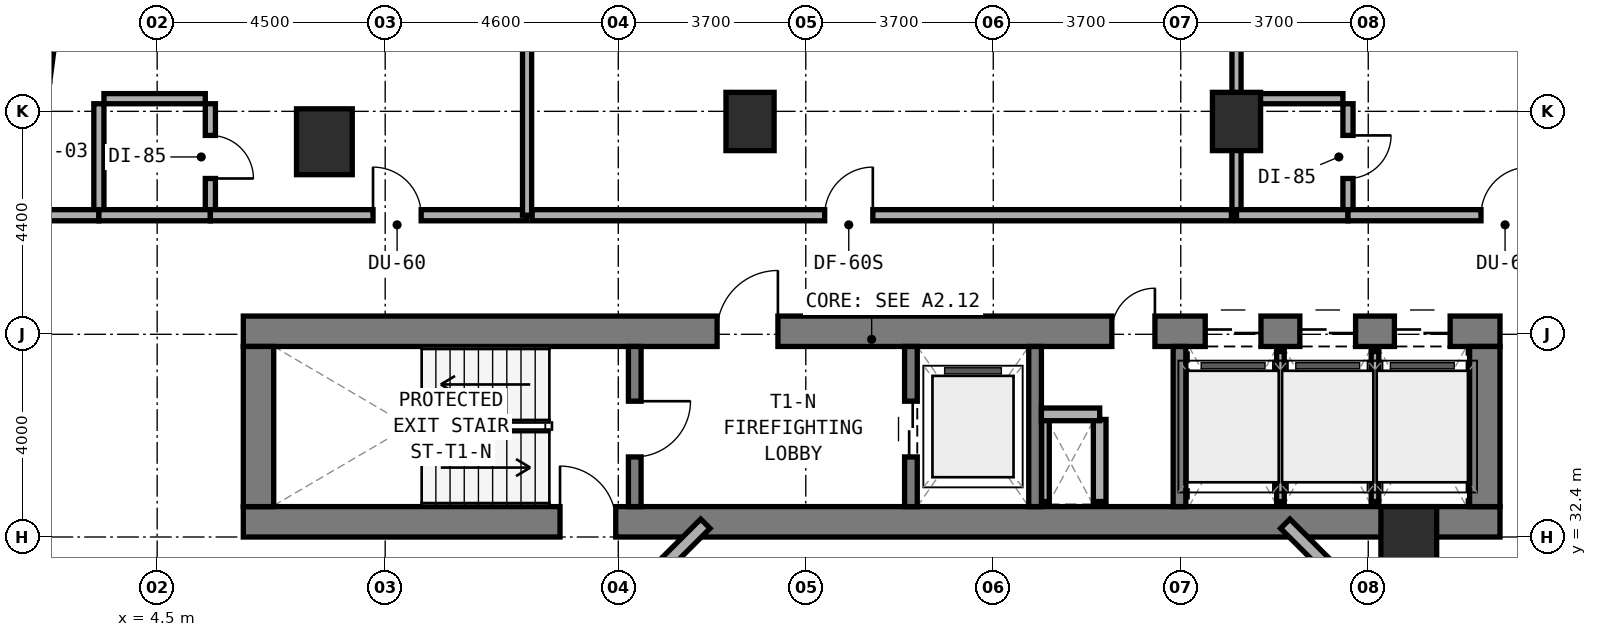
"""IFC4 building model, lengths in metres.
Left out: names, types, materials, properties, quantities, classifications, styles, units other than length and angle.
Written with IfcOpenShell. Run it as: python <this file> out.ifc"""

import sys

from ifc_helpers import new_model, si_unit, direction, frame, frame_2d, origin, origin_2d, place, context, subcontext, project, spatial, rectangle, extrude, element, fill, save


model = new_model("IFC4")
c1 = context("Model", 3, precision=1e-05, world=origin(), true_north=direction((0.0, 1.0)))
c2 = subcontext(c1, "Body", "Model", "MODEL_VIEW")
j1 = project(units=[si_unit("LENGTHUNIT", "METRE"), si_unit("PLANEANGLEUNIT", "RADIAN")], contexts=[c1])
p1 = place(None, origin())
s1 = spatial("IfcSite", under=j1, at=p1, CompositionType="ELEMENT")
p2 = place(p1, origin())
s2 = spatial("IfcBuilding", under=s1, at=p2, CompositionType="ELEMENT")
p3 = place(p2, frame((0.0, 0.0, 45.0)))
s3 = spatial("IfcBuildingStorey", under=s2, at=p3, CompositionType="ELEMENT", Elevation=45.0)
p4 = place(p3, frame((6.2, 32.7, 0.0), z_axis=(0.0, 0.0, 1.0), x_axis=(1.0, 0.0, 0.0)))
e1 = element("IfcWall", 1, at=p4, inside=s3, PredefinedType="SHEAR", context=c2, shape_type="SweptSolid", body=[
    extrude(rectangle(XDim=24.8, YDim=0.6, at=frame_2d((12.4, 0.0))), origin(), (0.0, 0.0, 1.0), 3.5),
])
p5 = place(p4, frame((6.25, 0.0, 0.0)))
e2 = element("IfcOpeningElement", 2, at=p5, cuts=e1, PredefinedType="OPENING", context=c2, shape_type="SweptSolid", body=[
    extrude(rectangle(XDim=1.1, YDim=2.15, at=frame_2d((0.55, 1.075))), frame((0.0, 0.31, 0.0), z_axis=(0.0, -1.0, 0.0), x_axis=(1.0, 0.0, 0.0)), (0.0, 0.0, 1.0), 0.62),
])
p6 = place(p3, frame((6.2, 36.46, 0.0), z_axis=(0.0, 0.0, 1.0), x_axis=(1.0, 0.0, 0.0)))
e3 = element("IfcWall", 3, at=p6, inside=s3, PredefinedType="SHEAR", context=c2, shape_type="SweptSolid", body=[
    extrude(rectangle(XDim=24.8, YDim=0.6, at=frame_2d((12.4, 0.0))), origin(), (0.0, 0.0, 1.0), 3.5),
])
p7 = place(p6, frame((9.35, 0.0, 0.0)))
e4 = element("IfcOpeningElement", 4, at=p7, cuts=e3, PredefinedType="OPENING", context=c2, shape_type="SweptSolid", body=[
    extrude(rectangle(XDim=1.2, YDim=2.15, at=frame_2d((0.6, 1.075))), frame((0.0, 0.31, 0.0), z_axis=(0.0, -1.0, 0.0), x_axis=(1.0, 0.0, 0.0)), (0.0, 0.0, 1.0), 0.62),
])
p8 = place(p6, frame((17.14, 0.0, 0.0)))
e5 = element("IfcOpeningElement", 5, at=p8, cuts=e3, PredefinedType="OPENING", context=c2, shape_type="SweptSolid", body=[
    extrude(rectangle(XDim=0.85, YDim=2.1, at=frame_2d((0.425, 1.05))), frame((0.0, 0.31, 0.0), z_axis=(0.0, -1.0, 0.0), x_axis=(1.0, 0.0, 0.0)), (0.0, 0.0, 1.0), 0.62),
])
p9 = place(p6, frame((18.983, 0.0, 0.0)))
e6 = element("IfcOpeningElement", 6, at=p9, cuts=e3, PredefinedType="OPENING", context=c2, shape_type="SweptSolid", body=[
    extrude(rectangle(XDim=1.1, YDim=2.15, at=frame_2d((0.55, 1.075))), frame((0.0, 0.31, 0.0), z_axis=(0.0, -1.0, 0.0), x_axis=(1.0, 0.0, 0.0)), (0.0, 0.0, 1.0), 0.62),
])
p10 = place(p6, frame((20.85, 0.0, 0.0)))
e7 = element("IfcOpeningElement", 7, at=p10, cuts=e3, PredefinedType="OPENING", context=c2, shape_type="SweptSolid", body=[
    extrude(rectangle(XDim=1.1, YDim=2.15, at=frame_2d((0.55, 1.075))), frame((0.0, 0.31, 0.0), z_axis=(0.0, -1.0, 0.0), x_axis=(1.0, 0.0, 0.0)), (0.0, 0.0, 1.0), 0.62),
])
p11 = place(p6, frame((22.716, 0.0, 0.0)))
e8 = element("IfcOpeningElement", 8, at=p11, cuts=e3, PredefinedType="OPENING", context=c2, shape_type="SweptSolid", body=[
    extrude(rectangle(XDim=1.1, YDim=2.15, at=frame_2d((0.55, 1.075))), frame((0.0, 0.31, 0.0), z_axis=(0.0, -1.0, 0.0), x_axis=(1.0, 0.0, 0.0)), (0.0, 0.0, 1.0), 0.62),
])
for number, where, z_axis, x_axis in (
    (9, (6.5, 33.0, 0.0), (0.0, 0.0, 1.0), (0.0, 1.0, 0.0)),
    (10, (30.7, 33.0, 0.0), (0.0, 0.0, 1.0), (0.0, 1.0, 0.0)),
):
    element("IfcWall", number, at=place(p3, frame(where, z_axis=z_axis, x_axis=x_axis)), inside=s3, PredefinedType="SHEAR", context=c2, shape_type="SweptSolid", body=[
        extrude(rectangle(XDim=3.16, YDim=0.6, at=frame_2d((1.58, 0.0))), origin(), (0.0, 0.0, 1.0), 3.5),
    ])
p12 = place(p3, frame((13.925, 33.0, 0.0), z_axis=(0.0, 0.0, 1.0), x_axis=(0.0, 1.0, 0.0)))
e11 = element("IfcWall", 11, at=p12, inside=s3, PredefinedType="STANDARD", context=c2, shape_type="SweptSolid", body=[
    extrude(rectangle(XDim=3.16, YDim=0.25, at=frame_2d((1.58, 0.0))), origin(), (0.0, 0.0, 1.0), 3.22),
])
p13 = place(p12, frame((0.98, 0.0, 0.0)))
e12 = element("IfcOpeningElement", 12, at=p13, cuts=e11, PredefinedType="OPENING", context=c2, shape_type="SweptSolid", body=[
    extrude(rectangle(XDim=1.1, YDim=2.15, at=frame_2d((0.55, 1.075))), frame((0.0, 0.135, 0.0), z_axis=(0.0, -1.0, 0.0), x_axis=(1.0, 0.0, 0.0)), (0.0, 0.0, 1.0), 0.27),
])
p14 = place(p3, frame((19.375, 33.0, 0.0), z_axis=(0.0, 0.0, 1.0), x_axis=(0.0, 1.0, 0.0)))
e13 = element("IfcWall", 13, at=p14, inside=s3, PredefinedType="STANDARD", context=c2, shape_type="SweptSolid", body=[
    extrude(rectangle(XDim=3.16, YDim=0.25, at=frame_2d((1.58, 0.0))), origin(), (0.0, 0.0, 1.0), 3.22),
])
p15 = place(p14, frame((0.98, 0.0, 0.0)))
e14 = element("IfcOpeningElement", 14, at=p15, cuts=e13, PredefinedType="OPENING", context=c2, shape_type="SweptSolid", body=[
    extrude(rectangle(XDim=1.1, YDim=2.15, at=frame_2d((0.55, 1.075))), frame((0.0, 0.135, 0.0), z_axis=(0.0, -1.0, 0.0), x_axis=(1.0, 0.0, 0.0)), (0.0, 0.0, 1.0), 0.27),
])
for number, where, z_axis, x_axis in (
    (15, (21.825, 33.0, 0.0), (0.0, 0.0, 1.0), (0.0, 1.0, 0.0)),
    (16, (24.675, 33.0, 0.0), (0.0, 0.0, 1.0), (0.0, 1.0, 0.0)),
):
    element("IfcWall", number, at=place(p3, frame(where, z_axis=z_axis, x_axis=x_axis)), inside=s3, PredefinedType="STANDARD", context=c2, shape_type="SweptSolid", body=[
        extrude(rectangle(XDim=3.16, YDim=0.25, at=frame_2d((1.58, 0.0))), origin(), (0.0, 0.0, 1.0), 3.22),
    ])
for number, where, z_axis, x_axis in (
    (17, (16.2, 40.6, 0.0), (0.0, 0.0, 1.0), (1.0, 0.0, 0.0)),
    (18, (25.8, 40.6, 0.0), (0.0, 0.0, 1.0), (1.0, 0.0, 0.0)),
):
    element("IfcColumn", number, at=place(p3, frame(where, z_axis=z_axis, x_axis=x_axis)), inside=s3, PredefinedType="COLUMN", context=c2, shape_type="SweptSolid", body=[
        extrude(rectangle(XDim=0.95, YDim=1.15, at=origin_2d()), origin(), (0.0, 0.0, 1.0), 3.5),
    ])
for number, where, z_axis, x_axis in (
    (19, (7.8, 40.2, 0.0), (0.0, 0.0, 1.0), (1.0, 0.0, 0.0)),
    (20, (29.2, 32.35, 0.0), (0.0, 0.0, 1.0), (1.0, 0.0, 0.0)),
):
    element("IfcColumn", number, at=place(p3, frame(where, z_axis=z_axis, x_axis=x_axis)), inside=s3, PredefinedType="COLUMN", context=c2, shape_type="SweptSolid", body=[
        extrude(rectangle(XDim=1.1, YDim=1.3, at=origin_2d()), origin(), (0.0, 0.0, 1.0), 3.5),
    ])
p16 = place(p3, frame((2.355, 42.337, 0.0), z_axis=(0.0, 0.0, 1.0), x_axis=(-0.130454512571, -0.991454295543, 0.0)))
e21 = element("IfcWall", 21, at=p16, inside=s3, PredefinedType="STANDARD", context=c2, shape_type="SweptSolid", body=[
    extrude(rectangle(XDim=0.973, YDim=0.3, at=frame_2d((0.487, 0.0))), origin(), (0.0, 0.0, 1.0), 3.22),
])
p17 = place(p3, frame((28.596, 30.828, 0.0), z_axis=(0.0, 0.0, 1.0), x_axis=(-0.707059717605, 0.707153841636, 0.0)))
e22 = element("IfcWall", 22, at=p17, inside=s3, PredefinedType="STANDARD", context=c2, shape_type="SweptSolid", body=[
    extrude(rectangle(XDim=2.594, YDim=0.26, at=frame_2d((1.297, 0.0))), origin(), (0.0, 0.0, 1.0), 3.22),
])
p18 = place(p3, frame((15.318, 32.662, 0.0), z_axis=(0.0, 0.0, 1.0), x_axis=(-0.707106781187, -0.707106781187, 0.0)))
e23 = element("IfcWall", 23, at=p18, inside=s3, PredefinedType="STANDARD", context=c2, shape_type="SweptSolid", body=[
    extrude(rectangle(XDim=2.594, YDim=0.26, at=frame_2d((1.297, 0.0))), origin(), (0.0, 0.0, 1.0), 3.22),
])
p19 = place(p3, frame((22.03, 33.1, 0.0), z_axis=(0.0, 0.0, 1.0), x_axis=(0.0, 1.0, 0.0)))
e24 = element("IfcWall", 24, at=p19, inside=s3, PredefinedType="PARTITIONING", context=c2, shape_type="SweptSolid", body=[
    extrude(rectangle(XDim=1.62, YDim=0.15, at=frame_2d((0.81, 0.0))), origin(), (0.0, 0.0, 1.0), 3.22),
])
p20 = place(p3, frame((23.1, 33.1, 0.0), z_axis=(0.0, 0.0, 1.0), x_axis=(0.0, 1.0, 0.0)))
e25 = element("IfcWall", 25, at=p20, inside=s3, PredefinedType="SOLIDWALL", context=c2, shape_type="SweptSolid", body=[
    extrude(rectangle(XDim=1.62, YDim=0.25, at=frame_2d((0.81, 0.0))), origin(), (0.0, 0.0, 1.0), 3.22),
])
p21 = place(p3, frame((21.95, 34.82, 0.0), z_axis=(0.0, 0.0, 1.0), x_axis=(1.0, 0.0, 0.0)))
e26 = element("IfcWall", 26, at=p21, inside=s3, PredefinedType="SOLIDWALL", context=c2, shape_type="SweptSolid", body=[
    extrude(rectangle(XDim=1.15, YDim=0.25, at=frame_2d((0.575, 0.0))), origin(), (0.0, 0.0, 1.0), 3.22),
])
p22 = place(p3, frame((26.667, 33.1, 0.0), z_axis=(0.0, 0.0, 1.0), x_axis=(0.0, 1.0, 0.0)))
e27 = element("IfcWall", 27, at=p22, inside=s3, PredefinedType="PARTITIONING", context=c2, shape_type="SweptSolid", body=[
    extrude(rectangle(XDim=2.96, YDim=0.15, at=frame_2d((1.48, 0.0))), origin(), (0.0, 0.0, 1.0), 3.22),
])
p23 = place(p3, frame((28.533, 33.1, 0.0), z_axis=(0.0, 0.0, 1.0), x_axis=(0.0, 1.0, 0.0)))
e28 = element("IfcWall", 28, at=p23, inside=s3, PredefinedType="PARTITIONING", context=c2, shape_type="SweptSolid", body=[
    extrude(rectangle(XDim=2.96, YDim=0.15, at=frame_2d((1.48, 0.0))), origin(), (0.0, 0.0, 1.0), 2.395),
])
p24 = place(p3, frame((5.55, 38.85, 0.0), z_axis=(0.0, 0.0, 1.0), x_axis=(0.0, 1.0, 0.0)))
e29 = element("IfcWall", 29, at=p24, inside=s3, PredefinedType="PLUMBINGWALL", context=c2, shape_type="SweptSolid", body=[
    extrude(rectangle(XDim=2.1, YDim=0.2, at=frame_2d((1.05, 0.0))), origin(), (0.0, 0.0, 1.0), 3.22),
])
p25 = place(p24, frame((0.625, 0.0, 0.0)))
e30 = element("IfcOpeningElement", 30, at=p25, cuts=e29, PredefinedType="OPENING", context=c2, shape_type="SweptSolid", body=[
    extrude(rectangle(XDim=0.85, YDim=2.1, at=frame_2d((0.425, 1.05))), frame((0.0, 0.11, 0.0), z_axis=(0.0, -1.0, 0.0), x_axis=(1.0, 0.0, 0.0)), (0.0, 0.0, 1.0), 0.22),
])
p26 = place(p3, frame((3.45, 41.05, 0.0), z_axis=(0.0, 0.0, 1.0), x_axis=(1.0, 0.0, 0.0)))
e31 = element("IfcWall", 31, at=p26, inside=s3, PredefinedType="PLUMBINGWALL", context=c2, shape_type="SweptSolid", body=[
    extrude(rectangle(XDim=2.0, YDim=0.2, at=frame_2d((1.0, 0.0))), origin(), (0.0, 0.0, 1.0), 3.22),
])
p27 = place(p3, frame((3.35, 38.85, 0.0), z_axis=(0.0, 0.0, 1.0), x_axis=(0.0, 1.0, 0.0)))
e32 = element("IfcWall", 32, at=p27, inside=s3, PredefinedType="PLUMBINGWALL", context=c2, shape_type="SweptSolid", body=[
    extrude(rectangle(XDim=2.1, YDim=0.2, at=frame_2d((1.05, 0.0))), origin(), (0.0, 0.0, 1.0), 3.22),
])
p28 = place(p3, frame((0.24, 38.75, 0.0), z_axis=(0.0, 0.0, 1.0), x_axis=(1.0, 0.0, 0.0)))
e33 = element("IfcWall", 33, at=p28, inside=s3, PredefinedType="SOLIDWALL", context=c2, shape_type="SweptSolid", body=[
    extrude(rectangle(XDim=3.11, YDim=0.22, at=frame_2d((1.555, 0.0))), origin(), (0.0, 0.0, 1.0), 3.22),
])
p29 = place(p3, frame((3.35, 38.75, 0.0), z_axis=(0.0, 0.0, 1.0), x_axis=(1.0, 0.0, 0.0)))
e34 = element("IfcWall", 34, at=p29, inside=s3, PredefinedType="SOLIDWALL", context=c2, shape_type="SweptSolid", body=[
    extrude(rectangle(XDim=2.2, YDim=0.22, at=frame_2d((1.1, 0.0))), origin(), (0.0, 0.0, 1.0), 3.22),
])
p30 = place(p3, frame((5.55, 38.75, 0.0), z_axis=(0.0, 0.0, 1.0), x_axis=(1.0, 0.0, 0.0)))
e35 = element("IfcWall", 35, at=p30, inside=s3, PredefinedType="SOLIDWALL", context=c2, shape_type="SweptSolid", body=[
    extrude(rectangle(XDim=6.25, YDim=0.22, at=frame_2d((3.125, 0.0))), origin(), (0.0, 0.0, 1.0), 2.395),
])
p31 = place(p30, frame((3.21, 0.0, 0.0)))
e36 = element("IfcOpeningElement", 36, at=p31, cuts=e35, PredefinedType="OPENING", context=c2, shape_type="SweptSolid", body=[
    extrude(rectangle(XDim=0.95, YDim=2.1, at=frame_2d((0.475, 1.05))), frame((0.0, 0.12, 0.0), z_axis=(0.0, -1.0, 0.0), x_axis=(1.0, 0.0, 0.0)), (0.0, 0.0, 1.0), 0.24),
])
p32 = place(p3, frame((11.8, 38.75, 0.0), z_axis=(0.0, 0.0, 1.0), x_axis=(0.0, 1.0, 0.0)))
e37 = element("IfcWall", 37, at=p32, inside=s3, PredefinedType="SOLIDWALL", context=c2, shape_type="SweptSolid", body=[
    extrude(rectangle(XDim=7.538, YDim=0.18, at=frame_2d((3.769, 0.0))), origin(), (0.0, 0.0, 1.0), 2.745),
])
p33 = place(p3, frame((11.9, 38.75, 0.0), z_axis=(0.0, 0.0, 1.0), x_axis=(1.0, 0.0, 0.0)))
e38 = element("IfcWall", 38, at=p33, inside=s3, PredefinedType="SOLIDWALL", context=c2, shape_type="SweptSolid", body=[
    extrude(rectangle(XDim=13.8, YDim=0.22, at=frame_2d((6.9, 0.0))), origin(), (0.0, 0.0, 1.0), 2.395),
])
p34 = place(p33, frame((5.773, 0.0, 0.0)))
e39 = element("IfcOpeningElement", 39, at=p34, cuts=e38, PredefinedType="OPENING", context=c2, shape_type="SweptSolid", body=[
    extrude(rectangle(XDim=0.95, YDim=2.1, at=frame_2d((0.475, 1.05))), frame((0.0, 0.12, 0.0), z_axis=(0.0, -1.0, 0.0), x_axis=(1.0, 0.0, 0.0)), (0.0, 0.0, 1.0), 0.24),
])
p35 = place(p3, frame((25.8, 38.75, 0.0), z_axis=(0.0, 0.0, 1.0), x_axis=(0.0, 1.0, 0.0)))
e40 = element("IfcWall", 40, at=p35, inside=s3, PredefinedType="SOLIDWALL", context=c2, shape_type="SweptSolid", body=[
    extrude(rectangle(XDim=8.19, YDim=0.18, at=frame_2d((4.095, 0.0))), origin(), (0.0, 0.0, 1.0), 2.395),
])
p36 = place(p3, frame((28.0, 38.85, 0.0), z_axis=(0.0, 0.0, 1.0), x_axis=(0.0, 1.0, 0.0)))
e41 = element("IfcWall", 41, at=p36, inside=s3, PredefinedType="PLUMBINGWALL", context=c2, shape_type="SweptSolid", body=[
    extrude(rectangle(XDim=2.1, YDim=0.2, at=frame_2d((1.05, 0.0))), origin(), (0.0, 0.0, 1.0), 2.745),
])
p37 = place(p36, frame((0.625, 0.0, 0.0)))
e42 = element("IfcOpeningElement", 42, at=p37, cuts=e41, PredefinedType="OPENING", context=c2, shape_type="SweptSolid", body=[
    extrude(rectangle(XDim=0.85, YDim=2.1, at=frame_2d((0.425, 1.05))), frame((0.0, 0.11, 0.0), z_axis=(0.0, -1.0, 0.0), x_axis=(1.0, 0.0, 0.0)), (0.0, 0.0, 1.0), 0.22),
])
p38 = place(p3, frame((25.9, 41.05, 0.0), z_axis=(0.0, 0.0, 1.0), x_axis=(1.0, 0.0, 0.0)))
e43 = element("IfcWall", 43, at=p38, inside=s3, PredefinedType="PLUMBINGWALL", context=c2, shape_type="SweptSolid", body=[
    extrude(rectangle(XDim=2.0, YDim=0.2, at=frame_2d((1.0, 0.0))), origin(), (0.0, 0.0, 1.0), 3.22),
])
p39 = place(p3, frame((25.8, 38.75, 0.0), z_axis=(0.0, 0.0, 1.0), x_axis=(1.0, 0.0, 0.0)))
e44 = element("IfcWall", 44, at=p39, inside=s3, PredefinedType="SOLIDWALL", context=c2, shape_type="SweptSolid", body=[
    extrude(rectangle(XDim=2.2, YDim=0.22, at=frame_2d((1.1, 0.0))), origin(), (0.0, 0.0, 1.0), 2.395),
])
p40 = place(p3, frame((28.0, 38.75, 0.0), z_axis=(0.0, 0.0, 1.0), x_axis=(1.0, 0.0, 0.0)))
e45 = element("IfcWall", 45, at=p40, inside=s3, PredefinedType="SOLIDWALL", context=c2, shape_type="SweptSolid", body=[
    extrude(rectangle(XDim=6.2, YDim=0.22, at=frame_2d((3.1, 0.0))), origin(), (0.0, 0.0, 1.0), 2.395),
])
p41 = place(p40, frame((2.625, 0.0, 0.0)))
e46 = element("IfcOpeningElement", 46, at=p41, cuts=e45, PredefinedType="OPENING", context=c2, shape_type="SweptSolid", body=[
    extrude(rectangle(XDim=0.95, YDim=2.1, at=frame_2d((0.475, 1.05))), frame((0.0, 0.12, 0.0), z_axis=(0.0, -1.0, 0.0), x_axis=(1.0, 0.0, 0.0)), (0.0, 0.0, 1.0), 0.24),
])
p42 = place(p13, frame((1.1, 0.0, 0.0), z_axis=(0.0, 0.0, 1.0), x_axis=(-1.0, 0.0, 0.0)))
e47 = element("IfcDoor", 47, at=p42, inside=s3, OperationType="SINGLE_SWING_LEFT", PredefinedType="DOOR", context=c2, shape_type="SweptSolid", body=[
    extrude(rectangle(XDim=1.1, YDim=2.15, at=frame_2d((0.55, 1.075))), frame((0.0, 0.025, 0.0), z_axis=(0.0, -1.0, 0.0), x_axis=(1.0, 0.0, 0.0)), (0.0, 0.0, 1.0), 0.05),
])
fill(e12, e47)
p43 = place(p7, origin())
e48 = element("IfcDoor", 48, at=p43, inside=s3, OperationType="SINGLE_SWING_RIGHT", PredefinedType="DOOR", context=c2, shape_type="SweptSolid", body=[
    extrude(rectangle(XDim=1.2, YDim=2.15, at=frame_2d((0.6, 1.075))), frame((0.0, 0.025, 0.0), z_axis=(0.0, -1.0, 0.0), x_axis=(1.0, 0.0, 0.0)), (0.0, 0.0, 1.0), 0.05),
])
fill(e4, e48)
p44 = place(p15, origin())
e49 = element("IfcDoor", 49, at=p44, inside=s3, OperationType="DOUBLE_DOOR_SLIDING", PredefinedType="DOOR", context=c2, shape_type="SweptSolid", body=[
    extrude(rectangle(XDim=1.1, YDim=2.15, at=frame_2d((0.55, 1.075))), frame((0.0, 0.025, 0.0), z_axis=(0.0, -1.0, 0.0), x_axis=(1.0, 0.0, 0.0)), (0.0, 0.0, 1.0), 0.05),
])
fill(e14, e49)
p45 = place(p8, origin())
e50 = element("IfcDoor", 50, at=p45, inside=s3, OperationType="SINGLE_SWING_RIGHT", PredefinedType="DOOR", context=c2, shape_type="SweptSolid", body=[
    extrude(rectangle(XDim=0.85, YDim=2.1, at=frame_2d((0.425, 1.05))), frame((0.0, 0.025, 0.0), z_axis=(0.0, -1.0, 0.0), x_axis=(1.0, 0.0, 0.0)), (0.0, 0.0, 1.0), 0.05),
])
fill(e5, e50)
p46 = place(p9, origin())
e51 = element("IfcDoor", 51, at=p46, inside=s3, OperationType="DOUBLE_DOOR_SLIDING", PredefinedType="DOOR", context=c2, shape_type="SweptSolid", body=[
    extrude(rectangle(XDim=1.1, YDim=2.15, at=frame_2d((0.55, 1.075))), frame((0.0, 0.025, 0.0), z_axis=(0.0, -1.0, 0.0), x_axis=(1.0, 0.0, 0.0)), (0.0, 0.0, 1.0), 0.05),
])
fill(e6, e51)
p47 = place(p10, origin())
e52 = element("IfcDoor", 52, at=p47, inside=s3, OperationType="DOUBLE_DOOR_SLIDING", PredefinedType="DOOR", context=c2, shape_type="SweptSolid", body=[
    extrude(rectangle(XDim=1.1, YDim=2.15, at=frame_2d((0.55, 1.075))), frame((0.0, 0.025, 0.0), z_axis=(0.0, -1.0, 0.0), x_axis=(1.0, 0.0, 0.0)), (0.0, 0.0, 1.0), 0.05),
])
fill(e7, e52)
p48 = place(p11, origin())
e53 = element("IfcDoor", 53, at=p48, inside=s3, OperationType="DOUBLE_DOOR_SLIDING", PredefinedType="DOOR", context=c2, shape_type="SweptSolid", body=[
    extrude(rectangle(XDim=1.1, YDim=2.15, at=frame_2d((0.55, 1.075))), frame((0.0, 0.025, 0.0), z_axis=(0.0, -1.0, 0.0), x_axis=(1.0, 0.0, 0.0)), (0.0, 0.0, 1.0), 0.05),
])
fill(e8, e53)
p49 = place(p5, origin())
e54 = element("IfcDoor", 54, at=p49, inside=s3, OperationType="SINGLE_SWING_LEFT", PredefinedType="DOOR", context=c2, shape_type="SweptSolid", body=[
    extrude(rectangle(XDim=1.1, YDim=2.15, at=frame_2d((0.55, 1.075))), frame((0.0, 0.025, 0.0), z_axis=(0.0, -1.0, 0.0), x_axis=(1.0, 0.0, 0.0)), (0.0, 0.0, 1.0), 0.05),
])
fill(e2, e54)
p50 = place(p25, frame((0.85, 0.0, 0.0), z_axis=(0.0, 0.0, 1.0), x_axis=(-1.0, 0.0, 0.0)))
e55 = element("IfcDoor", 55, at=p50, inside=s3, OperationType="SINGLE_SWING_RIGHT", PredefinedType="DOOR", context=c2, shape_type="SweptSolid", body=[
    extrude(rectangle(XDim=0.85, YDim=2.1, at=frame_2d((0.425, 1.05))), frame((0.0, 0.025, 0.0), z_axis=(0.0, -1.0, 0.0), x_axis=(1.0, 0.0, 0.0)), (0.0, 0.0, 1.0), 0.05),
])
fill(e30, e55)
p51 = place(p31, origin())
e56 = element("IfcDoor", 56, at=p51, inside=s3, OperationType="SINGLE_SWING_LEFT", PredefinedType="DOOR", context=c2, shape_type="SweptSolid", body=[
    extrude(rectangle(XDim=0.95, YDim=2.1, at=frame_2d((0.475, 1.05))), frame((0.0, 0.025, 0.0), z_axis=(0.0, -1.0, 0.0), x_axis=(1.0, 0.0, 0.0)), (0.0, 0.0, 1.0), 0.05),
])
fill(e36, e56)
p52 = place(p34, origin())
e57 = element("IfcDoor", 57, at=p52, inside=s3, OperationType="SINGLE_SWING_RIGHT", PredefinedType="DOOR", context=c2, shape_type="SweptSolid", body=[
    extrude(rectangle(XDim=0.95, YDim=2.1, at=frame_2d((0.475, 1.05))), frame((0.0, 0.025, 0.0), z_axis=(0.0, -1.0, 0.0), x_axis=(1.0, 0.0, 0.0)), (0.0, 0.0, 1.0), 0.05),
])
fill(e39, e57)
p53 = place(p37, frame((0.85, 0.0, 0.0), z_axis=(0.0, 0.0, 1.0), x_axis=(-1.0, 0.0, 0.0)))
e58 = element("IfcDoor", 58, at=p53, inside=s3, OperationType="SINGLE_SWING_LEFT", PredefinedType="DOOR", context=c2, shape_type="SweptSolid", body=[
    extrude(rectangle(XDim=0.85, YDim=2.1, at=frame_2d((0.425, 1.05))), frame((0.0, 0.025, 0.0), z_axis=(0.0, -1.0, 0.0), x_axis=(1.0, 0.0, 0.0)), (0.0, 0.0, 1.0), 0.05),
])
fill(e42, e58)
p54 = place(p41, origin())
e59 = element("IfcDoor", 59, at=p54, inside=s3, OperationType="SINGLE_SWING_RIGHT", PredefinedType="DOOR", context=c2, shape_type="SweptSolid", body=[
    extrude(rectangle(XDim=0.95, YDim=2.1, at=frame_2d((0.475, 1.05))), frame((0.0, 0.025, 0.0), z_axis=(0.0, -1.0, 0.0), x_axis=(1.0, 0.0, 0.0)), (0.0, 0.0, 1.0), 0.05),
])
fill(e46, e59)
save(model, sys.argv[1])
